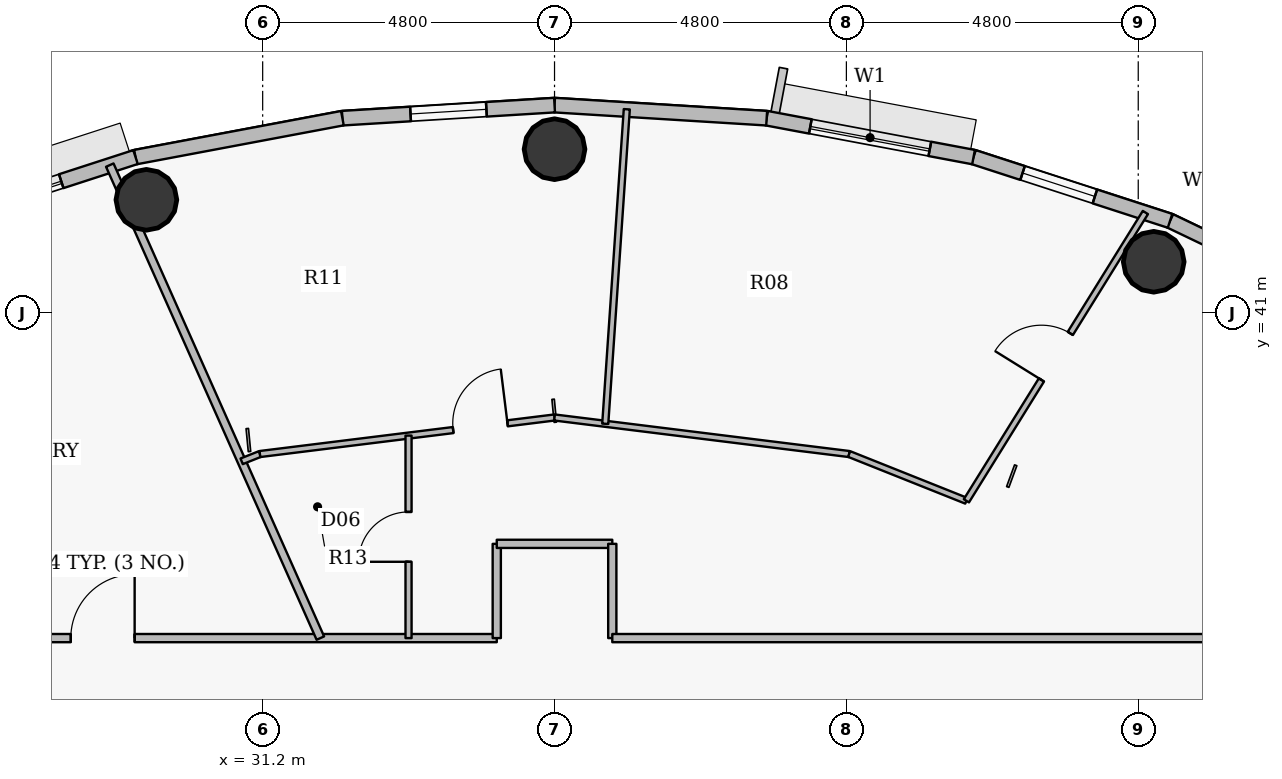
"""IFC4 building model, lengths in metres.
Left out: names, types, materials, properties, quantities, classifications, styles, units other than length and angle.
Written with IfcOpenShell. Run it as: python <this file> out.ifc"""

import sys

from ifc_helpers import new_model, si_unit, direction, frame, frame_2d, origin, origin_2d, place, context, subcontext, project, spatial, rectangle, hollow_circle, extrude, source, transform, mapped, element, fill, save


model = new_model("IFC4")
c1 = context("Model", 3, precision=1e-05, world=origin(), true_north=direction((0.0, 1.0)))
c2 = subcontext(c1, "Body", "Model", "MODEL_VIEW")
j1 = project(units=[si_unit("LENGTHUNIT", "METRE"), si_unit("PLANEANGLEUNIT", "RADIAN")], contexts=[c1])
p1 = place(None, origin())
s1 = spatial("IfcSite", under=j1, at=p1, CompositionType="ELEMENT")
p2 = place(p1, origin())
s2 = spatial("IfcBuilding", under=s1, at=p2, CompositionType="ELEMENT")
p3 = place(p2, frame((0.0, 0.0, 306.75)))
s3 = spatial("IfcBuildingStorey", under=s2, at=p3, CompositionType="ELEMENT", Elevation=306.75)
for number, where, z_axis, x_axis in (
    (1, (45.854, 41.839, 0.0), (0.0, 0.0, 1.0), (1.0, 0.0, 0.0)),
    (2, (36.0, 43.69, 0.0), (0.0, 0.0, 1.0), (1.0, 0.0, 0.0)),
    (3, (29.288, 42.858, 0.0), (0.0, 0.0, 1.0), (1.0, 0.0, 0.0)),
):
    element("IfcColumn", number, at=place(p3, frame(where, z_axis=z_axis, x_axis=x_axis)), inside=s3, PredefinedType="COLUMN", context=c2, shape_type="SweptSolid", body=[
        extrude(hollow_circle(Radius=0.5, WallThickness=0.032, at=origin_2d()), origin(), (0.0, 0.0, 1.0), 3.75),
    ])
p4 = place(p3, frame((46.123, 42.512, 0.0), z_axis=(0.0, 0.0, 1.0), x_axis=(0.901573741254, -0.43262546051, 0.0)))
e4 = element("IfcWall", 4, at=p4, inside=s3, PredefinedType="SOLIDWALL", context=c2, shape_type="SweptSolid", body=[
    extrude(rectangle(XDim=3.307, YDim=0.24, at=frame_2d((1.653, 0.0))), origin(), (0.0, 0.0, 1.0), 3.5),
])
p5 = place(p4, frame((0.853, 0.0, 0.9)))
e5 = element("IfcOpeningElement", 5, at=p5, cuts=e4, PredefinedType="OPENING", context=c2, shape_type="SweptSolid", body=[
    extrude(rectangle(XDim=1.6, YDim=1.75, at=origin_2d()), frame((0.8, 0.13, 0.875), z_axis=(0.0, -1.0, 0.0), x_axis=(1.0, 0.0, 0.0)), (0.0, 0.0, 1.0), 0.26),
])
p6 = place(p3, frame((42.891, 43.56, 0.0), z_axis=(0.0, 0.0, 1.0), x_axis=(0.95123136723, -0.308478339592, 0.0)))
e6 = element("IfcWall", 6, at=p6, inside=s3, PredefinedType="SOLIDWALL", context=c2, shape_type="SweptSolid", body=[
    extrude(rectangle(XDim=3.398, YDim=0.24, at=frame_2d((1.699, 0.0))), origin(), (0.0, 0.0, 1.0), 3.5),
])
p7 = place(p6, frame((0.848, 0.0, 0.9)))
e7 = element("IfcOpeningElement", 7, at=p7, cuts=e6, PredefinedType="OPENING", context=c2, shape_type="SweptSolid", body=[
    extrude(rectangle(XDim=1.25, YDim=1.65, at=origin_2d()), frame((0.625, 0.13, 0.825), z_axis=(0.0, -1.0, 0.0), x_axis=(1.0, 0.0, 0.0)), (0.0, 0.0, 1.0), 0.26),
])
p8 = place(p3, frame((39.489, 44.2, 0.0), z_axis=(0.0, 0.0, 1.0), x_axis=(0.982782655757, -0.184765395959, 0.0)))
e8 = element("IfcWall", 8, at=p8, inside=s3, PredefinedType="SOLIDWALL", context=c2, shape_type="SweptSolid", body=[
    extrude(rectangle(XDim=3.462, YDim=0.24, at=frame_2d((1.731, 0.0))), origin(), (0.0, 0.0, 1.0), 3.5),
])
p9 = place(p8, frame((0.731, 0.0, 0.9)))
e9 = element("IfcOpeningElement", 9, at=p9, cuts=e8, PredefinedType="OPENING", context=c2, shape_type="SweptSolid", body=[
    extrude(rectangle(XDim=2.0, YDim=1.75, at=origin_2d()), frame((1.0, 0.13, 0.875), z_axis=(0.0, -1.0, 0.0), x_axis=(1.0, 0.0, 0.0)), (0.0, 0.0, 1.0), 0.26),
])
p10 = place(p3, frame((36.0, 44.415, 0.0), z_axis=(0.0, 0.0, 1.0), x_axis=(0.998104946479, -0.061534671648, 0.0)))
e10 = element("IfcWall", 10, at=p10, inside=s3, PredefinedType="SOLIDWALL", context=c2, shape_type="SweptSolid", body=[
    extrude(rectangle(XDim=3.495, YDim=0.24, at=frame_2d((1.748, 0.0))), origin(), (0.0, 0.0, 1.0), 3.5),
])
p11 = place(p3, frame((32.511, 44.2, 0.0), z_axis=(0.0, 0.0, 1.0), x_axis=(0.998104946479, 0.061534671648, 0.0)))
e11 = element("IfcWall", 11, at=p11, inside=s3, PredefinedType="SOLIDWALL", context=c2, shape_type="SweptSolid", body=[
    extrude(rectangle(XDim=3.495, YDim=0.24, at=frame_2d((1.748, 0.0))), origin(), (0.0, 0.0, 1.0), 3.5),
])
p12 = place(p11, frame((1.123, 0.0, 0.9)))
e12 = element("IfcOpeningElement", 12, at=p12, cuts=e11, PredefinedType="OPENING", context=c2, shape_type="SweptSolid", body=[
    extrude(rectangle(XDim=1.25, YDim=1.65, at=origin_2d()), frame((0.625, 0.13, 0.825), z_axis=(0.0, -1.0, 0.0), x_axis=(1.0, 0.0, 0.0)), (0.0, 0.0, 1.0), 0.26),
])
p13 = place(p3, frame((29.109, 43.56, 0.0), z_axis=(0.0, 0.0, 1.0), x_axis=(0.982782655757, 0.184765395959, 0.0)))
e13 = element("IfcWall", 13, at=p13, inside=s3, PredefinedType="SOLIDWALL", context=c2, shape_type="SweptSolid", body=[
    extrude(rectangle(XDim=3.462, YDim=0.24, at=frame_2d((1.731, 0.0))), origin(), (0.0, 0.0, 1.0), 3.5),
])
p14 = place(p3, frame((25.877, 42.512, 0.0), z_axis=(0.0, 0.0, 1.0), x_axis=(0.95123136723, 0.308478339592, 0.0)))
e14 = element("IfcWall", 14, at=p14, inside=s3, PredefinedType="SOLIDWALL", context=c2, shape_type="SweptSolid", body=[
    extrude(rectangle(XDim=3.398, YDim=0.24, at=frame_2d((1.699, 0.0))), origin(), (0.0, 0.0, 1.0), 3.5),
])
p15 = place(p14, frame((0.863, 0.0, 0.9)))
e15 = element("IfcOpeningElement", 15, at=p15, cuts=e14, PredefinedType="OPENING", context=c2, shape_type="SweptSolid", body=[
    extrude(rectangle(XDim=1.25, YDim=1.65, at=origin_2d()), frame((0.625, 0.13, 0.825), z_axis=(0.0, -1.0, 0.0), x_axis=(1.0, 0.0, 0.0)), (0.0, 0.0, 1.0), 0.26),
])
p16 = place(p3, frame((24.95, 35.65, 0.0), z_axis=(0.0, 0.0, 1.0), x_axis=(1.0, 0.0, 0.0)))
e16 = element("IfcWall", 16, at=p16, inside=s3, PredefinedType="PARTITIONING", context=c2, shape_type="SweptSolid", body=[
    extrude(rectangle(XDim=10.1, YDim=0.135, at=frame_2d((5.05, 0.0))), origin(), (0.0, 0.0, 1.0), 3.035),
])
p17 = place(p16, frame((3.094, 0.0, 0.0)))
e17 = element("IfcOpeningElement", 17, at=p17, cuts=e16, PredefinedType="OPENING", context=c2, shape_type="SweptSolid", body=[
    extrude(rectangle(XDim=1.05, YDim=2.15, at=origin_2d()), frame((0.525, 0.078, 1.075), z_axis=(0.0, -1.0, 0.0), x_axis=(1.0, 0.0, 0.0)), (0.0, 0.0, 1.0), 0.155),
])
p18 = place(p3, frame((28.686, 43.428, 0.0), z_axis=(0.0, 0.0, 1.0), x_axis=(0.406736980157, -0.913545307564, 0.0)))
e18 = element("IfcWall", 18, at=p18, inside=s3, PredefinedType="PARTITIONING", context=c2, shape_type="SweptSolid", body=[
    extrude(rectangle(XDim=8.514, YDim=0.135, at=frame_2d((4.257, 0.0))), origin(), (0.0, 0.0, 1.0), 3.035),
])
p19 = place(p3, frame((30.854, 38.557, 0.0), z_axis=(0.0, 0.0, 1.0), x_axis=(0.928996661722, 0.370088101011, 0.0)))
e19 = element("IfcWall", 19, at=p19, inside=s3, PredefinedType="PARTITIONING", context=c2, shape_type="SweptSolid", body=[
    extrude(rectangle(XDim=0.323, YDim=0.1, at=frame_2d((0.162, 0.0))), origin(), (0.0, 0.0, 1.0), 3.035),
])
p20 = place(p3, frame((31.155, 38.677, 0.0), z_axis=(0.0, 0.0, 1.0), x_axis=(0.99239360053, 0.123105408601, 0.0)))
e20 = element("IfcWall", 20, at=p20, inside=s3, PredefinedType="PARTITIONING", context=c2, shape_type="SweptSolid", body=[
    extrude(rectangle(XDim=4.883, YDim=0.1, at=frame_2d((2.441, 0.0))), origin(), (0.0, 0.0, 1.0), 2.985),
])
p21 = place(p20, frame((3.203, 0.0, 0.0)))
e21 = element("IfcOpeningElement", 21, at=p21, cuts=e20, PredefinedType="OPENING", context=c2, shape_type="SweptSolid", body=[
    extrude(rectangle(XDim=0.9, YDim=2.1, at=origin_2d()), frame((0.45, 0.06, 1.05), z_axis=(0.0, -1.0, 0.0), x_axis=(1.0, 0.0, 0.0)), (0.0, 0.0, 1.0), 0.12),
])
p22 = place(p3, frame((33.599, 35.65, 0.0), z_axis=(0.0, 0.0, 1.0), x_axis=(0.0, 1.0, 0.0)))
e22 = element("IfcWall", 22, at=p22, inside=s3, PredefinedType="PARTITIONING", context=c2, shape_type="SweptSolid", body=[
    extrude(rectangle(XDim=3.33, YDim=0.1, at=frame_2d((1.665, 0.0))), origin(), (0.0, 0.0, 1.0), 2.985),
])
p23 = place(p22, frame((1.255, 0.0, 0.0)))
e23 = element("IfcOpeningElement", 23, at=p23, cuts=e22, PredefinedType="OPENING", context=c2, shape_type="SweptSolid", body=[
    extrude(rectangle(XDim=0.82, YDim=2.1, at=origin_2d()), frame((0.41, 0.06, 1.05), z_axis=(0.0, -1.0, 0.0), x_axis=(1.0, 0.0, 0.0)), (0.0, 0.0, 1.0), 0.12),
])
p24 = place(p3, frame((35.05, 35.65, 0.0), z_axis=(0.0, 0.0, 1.0), x_axis=(0.0, 1.0, 0.0)))
e24 = element("IfcWall", 24, at=p24, inside=s3, PredefinedType="PARTITIONING", context=c2, shape_type="SweptSolid", body=[
    extrude(rectangle(XDim=1.55, YDim=0.135, at=frame_2d((0.775, 0.0))), origin(), (0.0, 0.0, 1.0), 3.5),
])
p25 = place(p3, frame((35.05, 37.2, 0.0), z_axis=(0.0, 0.0, 1.0), x_axis=(1.0, 0.0, 0.0)))
e25 = element("IfcWall", 25, at=p25, inside=s3, PredefinedType="PARTITIONING", context=c2, shape_type="SweptSolid", body=[
    extrude(rectangle(XDim=1.9, YDim=0.135, at=frame_2d((0.95, 0.0))), origin(), (0.0, 0.0, 1.0), 3.035),
])
p26 = place(p3, frame((36.0, 39.278, 0.0), z_axis=(0.0, 0.0, 1.0), x_axis=(0.992394358254, -0.123099300182, 0.0)))
e26 = element("IfcWall", 26, at=p26, inside=s3, PredefinedType="PARTITIONING", context=c2, shape_type="SweptSolid", body=[
    extrude(rectangle(XDim=4.883, YDim=0.1, at=frame_2d((2.441, 0.0))), origin(), (0.0, 0.0, 1.0), 2.985),
])
p27 = place(p3, frame((36.834, 39.175, 0.0), z_axis=(0.0, 0.0, 1.0), x_axis=(0.068331768218, 0.997662653131, 0.0)))
e27 = element("IfcWall", 27, at=p27, inside=s3, PredefinedType="PARTITIONING", context=c2, shape_type="SweptSolid", body=[
    extrude(rectangle(XDim=5.184, YDim=0.1, at=frame_2d((2.592, 0.0))), origin(), (0.0, 0.0, 1.0), 2.985),
])
p28 = place(p3, frame((36.95, 35.65, 0.0), z_axis=(0.0, 0.0, 1.0), x_axis=(0.0, 1.0, 0.0)))
e28 = element("IfcWall", 28, at=p28, inside=s3, PredefinedType="PARTITIONING", context=c2, shape_type="SweptSolid", body=[
    extrude(rectangle(XDim=1.55, YDim=0.135, at=frame_2d((0.775, 0.0))), origin(), (0.0, 0.0, 1.0), 3.5),
])
p29 = place(p3, frame((36.95, 35.65, 0.0), z_axis=(0.0, 0.0, 1.0), x_axis=(1.0, 0.0, 0.0)))
e29 = element("IfcWall", 29, at=p29, inside=s3, PredefinedType="PARTITIONING", context=c2, shape_type="SweptSolid", body=[
    extrude(rectangle(XDim=10.1, YDim=0.135, at=frame_2d((5.05, 0.0))), origin(), (0.0, 0.0, 1.0), 3.035),
])
p30 = place(p3, frame((40.845, 38.677, 0.0), z_axis=(0.0, 0.0, 1.0), x_axis=(0.928792693453, -0.370599693184, 0.0)))
e30 = element("IfcWall", 30, at=p30, inside=s3, PredefinedType="PARTITIONING", context=c2, shape_type="SweptSolid", body=[
    extrude(rectangle(XDim=2.076, YDim=0.1, at=frame_2d((1.038, 0.0))), origin(), (0.0, 0.0, 1.0), 3.5),
])
p31 = place(p3, frame((42.773, 37.908, 0.0), z_axis=(0.0, 0.0, 1.0), x_axis=(0.527527282505, 0.849538089913, 0.0)))
e31 = element("IfcWall", 31, at=p31, inside=s3, PredefinedType="PARTITIONING", context=c2, shape_type="SweptSolid", body=[
    extrude(rectangle(XDim=5.581, YDim=0.1, at=frame_2d((2.791, 0.0))), origin(), (0.0, 0.0, 1.0), 2.985),
])
p32 = place(p31, frame((2.34, 0.0, 0.0)))
e32 = element("IfcOpeningElement", 32, at=p32, cuts=e31, PredefinedType="OPENING", context=c2, shape_type="SweptSolid", body=[
    extrude(rectangle(XDim=0.9, YDim=2.1, at=origin_2d()), frame((0.45, 0.06, 1.05), z_axis=(0.0, -1.0, 0.0), x_axis=(1.0, 0.0, 0.0)), (0.0, 0.0, 1.0), 0.12),
])
m1 = source(origin(), c2, "Body", "SweptSolid", [
    extrude(rectangle(XDim=1.25, YDim=1.65, at=origin_2d()), frame((0.625, 0.03, 0.825), z_axis=(0.0, -1.0, 0.0), x_axis=(1.0, 0.0, 0.0)), (0.0, 0.0, 1.0), 0.06),
])
p33 = place(p7, origin())
e33 = element("IfcWindow", 33, at=p33, inside=s3, PartitioningType="SINGLE_PANEL", PredefinedType="WINDOW", context=c2, shape_type="MappedRepresentation", body=[
    mapped(m1, transform((0.0, 0.0, 0.0), x_axis=(1.0, 0.0, 0.0), y_axis=(0.0, 1.0, 0.0), z_axis=(0.0, 0.0, 1.0), scale=1.0)),
])
fill(e7, e33)
m2 = source(origin(), c2, "Body", "SweptSolid", [
    extrude(rectangle(XDim=2.0, YDim=1.75, at=origin_2d()), frame((1.0, 0.03, 0.875), z_axis=(0.0, -1.0, 0.0), x_axis=(1.0, 0.0, 0.0)), (0.0, 0.0, 1.0), 0.06),
])
p34 = place(p9, origin())
e34 = element("IfcWindow", 34, at=p34, inside=s3, PartitioningType="DOUBLE_PANEL_VERTICAL", PredefinedType="WINDOW", context=c2, shape_type="MappedRepresentation", body=[
    mapped(m2, transform((0.0, 0.0, 0.0), x_axis=(1.0, 0.0, 0.0), y_axis=(0.0, 1.0, 0.0), z_axis=(0.0, 0.0, 1.0), scale=1.0)),
])
fill(e9, e34)
p35 = place(p15, origin())
e35 = element("IfcWindow", 35, at=p35, inside=s3, PartitioningType="SINGLE_PANEL", PredefinedType="WINDOW", context=c2, shape_type="MappedRepresentation", body=[
    mapped(m1, transform((0.0, 0.0, 0.0), x_axis=(1.0, 0.0, 0.0), y_axis=(0.0, 1.0, 0.0), z_axis=(0.0, 0.0, 1.0), scale=1.0)),
])
fill(e15, e35)
p36 = place(p12, origin())
e36 = element("IfcWindow", 36, at=p36, inside=s3, PartitioningType="SINGLE_PANEL", PredefinedType="WINDOW", context=c2, shape_type="MappedRepresentation", body=[
    mapped(m1, transform((0.0, 0.0, 0.0), x_axis=(1.0, 0.0, 0.0), y_axis=(0.0, 1.0, 0.0), z_axis=(0.0, 0.0, 1.0), scale=1.0)),
])
fill(e12, e36)
m3 = source(origin(), c2, "Body", "SweptSolid", [
    extrude(rectangle(XDim=0.9, YDim=2.1, at=origin_2d()), frame((0.45, 0.025, 1.05), z_axis=(0.0, -1.0, 0.0), x_axis=(1.0, 0.0, 0.0)), (0.0, 0.0, 1.0), 0.05),
])
p37 = place(p32, origin())
e37 = element("IfcDoor", 37, at=p37, inside=s3, OperationType="SINGLE_SWING_LEFT", PredefinedType="DOOR", context=c2, shape_type="MappedRepresentation", body=[
    mapped(m3, transform((0.0, 0.0, 0.0), x_axis=(1.0, 0.0, 0.0), y_axis=(0.0, 1.0, 0.0), z_axis=(0.0, 0.0, 1.0), scale=1.0)),
])
fill(e32, e37)
p38 = place(p21, origin())
e38 = element("IfcDoor", 38, at=p38, inside=s3, OperationType="SINGLE_SWING_RIGHT", PredefinedType="DOOR", context=c2, shape_type="MappedRepresentation", body=[
    mapped(m3, transform((0.0, 0.0, 0.0), x_axis=(1.0, 0.0, 0.0), y_axis=(0.0, 1.0, 0.0), z_axis=(0.0, 0.0, 1.0), scale=1.0)),
])
fill(e21, e38)
m4 = source(origin(), c2, "Body", "SweptSolid", [
    extrude(rectangle(XDim=0.82, YDim=2.1, at=origin_2d()), frame((0.41, 0.025, 1.05), z_axis=(0.0, -1.0, 0.0), x_axis=(1.0, 0.0, 0.0)), (0.0, 0.0, 1.0), 0.05),
])
p39 = place(p23, origin())
e39 = element("IfcDoor", 39, at=p39, inside=s3, OperationType="SINGLE_SWING_LEFT", PredefinedType="DOOR", context=c2, shape_type="MappedRepresentation", body=[
    mapped(m4, transform((0.0, 0.0, 0.0), x_axis=(1.0, 0.0, 0.0), y_axis=(0.0, 1.0, 0.0), z_axis=(0.0, 0.0, 1.0), scale=1.0)),
])
fill(e23, e39)
m5 = source(origin(), c2, "Body", "SweptSolid", [
    extrude(rectangle(XDim=1.05, YDim=2.15, at=origin_2d()), frame((0.525, 0.025, 1.075), z_axis=(0.0, -1.0, 0.0), x_axis=(1.0, 0.0, 0.0)), (0.0, 0.0, 1.0), 0.05),
])
p40 = place(p17, origin())
e40 = element("IfcDoor", 40, at=p40, inside=s3, OperationType="SINGLE_SWING_RIGHT", PredefinedType="DOOR", context=c2, shape_type="MappedRepresentation", body=[
    mapped(m5, transform((0.0, 0.0, 0.0), x_axis=(1.0, 0.0, 0.0), y_axis=(0.0, 1.0, 0.0), z_axis=(0.0, 0.0, 1.0), scale=1.0)),
])
fill(e17, e40)
save(model, sys.argv[1])
